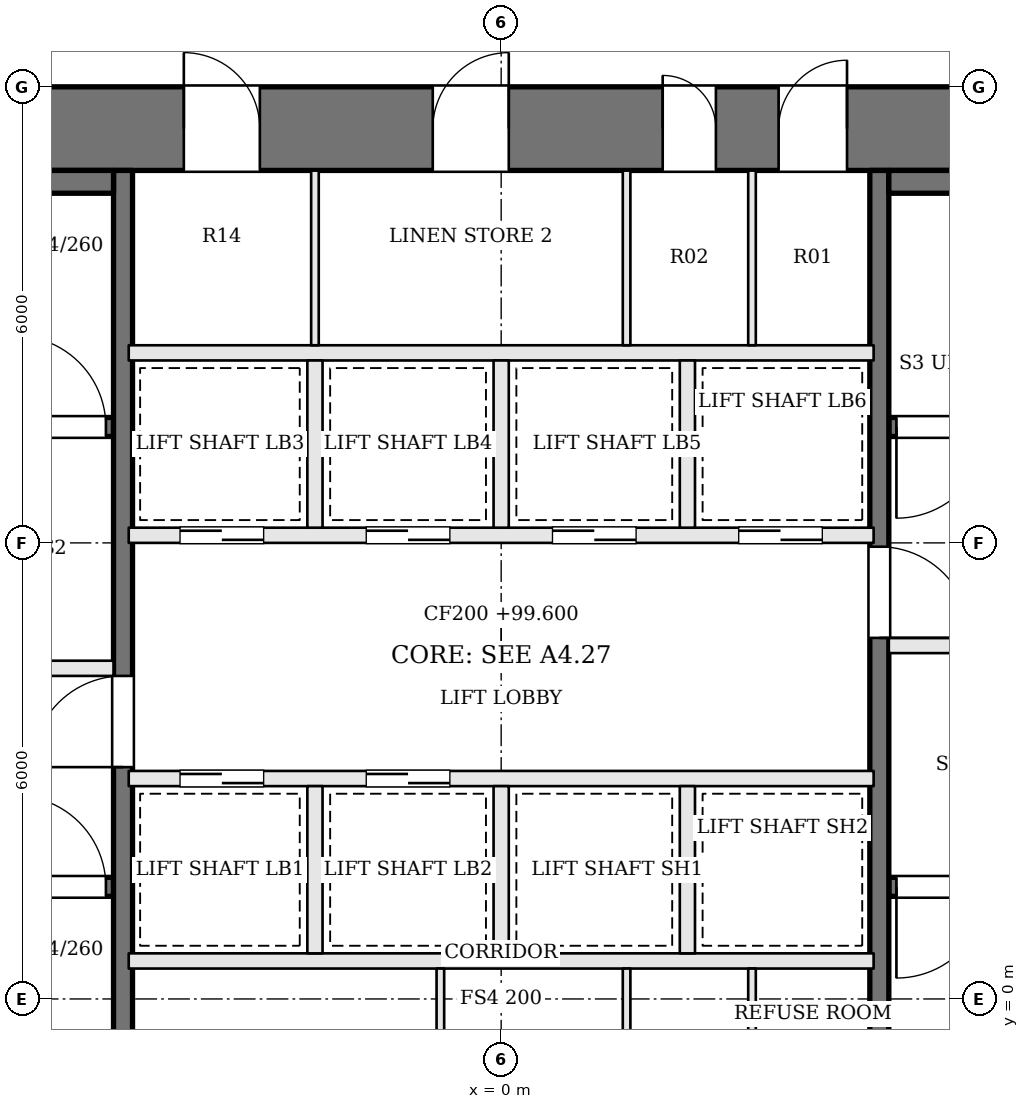
"""IFC4 building model, lengths in metres.
Left out: names, types, materials, properties, quantities, classifications, styles, units other than length and angle.
Written with IfcOpenShell. Run it as: python <this file> out.ifc"""

import sys

from ifc_helpers import new_model, si_unit, direction, frame, frame_2d, origin, place, context, subcontext, project, spatial, rectangle, extrude, element, fill, save


model = new_model("IFC4")
c1 = context("Model", 3, precision=1e-05, world=origin(), true_north=direction((0.0, 1.0)))
c2 = subcontext(c1, "Body", "Model", "MODEL_VIEW")
j1 = project(units=[si_unit("LENGTHUNIT", "METRE"), si_unit("PLANEANGLEUNIT", "RADIAN")], contexts=[c1])
p1 = place(None, origin())
s1 = spatial("IfcSite", under=j1, at=p1, CompositionType="ELEMENT")
p2 = place(p1, origin())
s2 = spatial("IfcBuilding", under=s1, at=p2, CompositionType="ELEMENT")
p3 = place(p2, frame((0.0, 0.0, 99.6)))
s3 = spatial("IfcBuildingStorey", under=s2, at=p3, CompositionType="ELEMENT", Elevation=99.6)
p4 = place(p3, frame((-13.0, 11.45, 0.0), z_axis=(0.0, 0.0, 1.0), x_axis=(1.0, 0.0, 0.0)))
e1 = element("IfcWall", 1, at=p4, inside=s3, PredefinedType="SHEAR", context=c2, shape_type="SweptSolid", body=[
    extrude(rectangle(XDim=26.0, YDim=1.1, at=frame_2d((13.0, 0.0))), origin(), (0.0, 0.0, 1.0), 3.6),
])
p5 = place(p4, frame((8.825, 0.0, 0.0)))
e2 = element("IfcOpeningElement", 2, at=p5, cuts=e1, PredefinedType="OPENING", context=c2, shape_type="SweptSolid", body=[
    extrude(rectangle(XDim=1.0, YDim=2.1, at=frame_2d((0.5, 1.05))), frame((0.0, 0.56, 0.0), z_axis=(0.0, -1.0, 0.0), x_axis=(1.0, 0.0, 0.0)), (0.0, 0.0, 1.0), 1.12),
])
p6 = place(p4, frame((12.1, 0.0, 0.0)))
e3 = element("IfcOpeningElement", 3, at=p6, cuts=e1, PredefinedType="OPENING", context=c2, shape_type="SweptSolid", body=[
    extrude(rectangle(XDim=1.0, YDim=2.1, at=frame_2d((0.5, 1.05))), frame((0.0, 0.56, 0.0), z_axis=(0.0, -1.0, 0.0), x_axis=(1.0, 0.0, 0.0)), (0.0, 0.0, 1.0), 1.12),
])
p7 = place(p4, frame((15.125, 0.0, 0.0)))
e4 = element("IfcOpeningElement", 4, at=p7, cuts=e1, PredefinedType="OPENING", context=c2, shape_type="SweptSolid", body=[
    extrude(rectangle(XDim=0.7, YDim=2.1, at=frame_2d((0.35, 1.05))), frame((0.0, 0.56, 0.0), z_axis=(0.0, -1.0, 0.0), x_axis=(1.0, 0.0, 0.0)), (0.0, 0.0, 1.0), 1.12),
])
p8 = place(p4, frame((16.65, 0.0, 0.0)))
e5 = element("IfcOpeningElement", 5, at=p8, cuts=e1, PredefinedType="OPENING", context=c2, shape_type="SweptSolid", body=[
    extrude(rectangle(XDim=0.9, YDim=2.1, at=frame_2d((0.45, 1.05))), frame((0.0, 0.56, 0.0), z_axis=(0.0, -1.0, 0.0), x_axis=(1.0, 0.0, 0.0)), (0.0, 0.0, 1.0), 1.12),
])
p9 = place(p3, frame((-11.9, 1.475, 0.0), z_axis=(0.0, 0.0, 1.0), x_axis=(1.0, 0.0, 0.0)))
e6 = element("IfcWall", 6, at=p9, inside=s3, PredefinedType="SOLIDWALL", context=c2, shape_type="SweptSolid", body=[
    extrude(rectangle(XDim=6.8, YDim=0.25, at=frame_2d((3.4, 0.0))), origin(), (0.0, 0.0, 1.0), 3.4),
])
p10 = place(p9, frame((5.5, 0.0, 0.0)))
e7 = element("IfcOpeningElement", 7, at=p10, cuts=e6, PredefinedType="OPENING", context=c2, shape_type="SweptSolid", body=[
    extrude(rectangle(XDim=1.2, YDim=2.1, at=frame_2d((0.6, 1.05))), frame((0.0, 0.135, 0.0), z_axis=(0.0, -1.0, 0.0), x_axis=(1.0, 0.0, 0.0)), (0.0, 0.0, 1.0), 0.27),
])
p11 = place(p3, frame((11.9, 7.525, 0.0), z_axis=(0.0, 0.0, 1.0), x_axis=(-1.0, 0.0, 0.0)))
e8 = element("IfcWall", 8, at=p11, inside=s3, PredefinedType="SOLIDWALL", context=c2, shape_type="SweptSolid", body=[
    extrude(rectangle(XDim=6.8, YDim=0.25, at=frame_2d((3.4, 0.0))), origin(), (0.0, 0.0, 1.0), 3.4),
])
p12 = place(p11, frame((5.5, 0.0, 0.0)))
e9 = element("IfcOpeningElement", 9, at=p12, cuts=e8, PredefinedType="OPENING", context=c2, shape_type="SweptSolid", body=[
    extrude(rectangle(XDim=1.2, YDim=2.1, at=frame_2d((0.6, 1.05))), frame((0.0, 0.135, 0.0), z_axis=(0.0, -1.0, 0.0), x_axis=(1.0, 0.0, 0.0)), (0.0, 0.0, 1.0), 0.27),
])
p13 = place(p3, frame((-11.9, 4.35, 0.0), z_axis=(0.0, 0.0, 1.0), x_axis=(1.0, 0.0, 0.0)))
e10 = element("IfcWall", 10, at=p13, inside=s3, PredefinedType="SOLIDWALL", context=c2, shape_type="SweptSolid", body=[
    extrude(rectangle(XDim=6.8, YDim=0.2, at=frame_2d((3.4, 0.0))), origin(), (0.0, 0.0, 1.0), 3.4),
])
p14 = place(p13, frame((4.1, 0.0, 0.0)))
e11 = element("IfcOpeningElement", 11, at=p14, cuts=e10, PredefinedType="OPENING", context=c2, shape_type="SweptSolid", body=[
    extrude(rectangle(XDim=1.2, YDim=2.1, at=frame_2d((0.6, 1.05))), frame((0.0, 0.11, 0.0), z_axis=(0.0, -1.0, 0.0), x_axis=(1.0, 0.0, 0.0)), (0.0, 0.0, 1.0), 0.22),
])
p15 = place(p13, frame((0.8, 0.0, 0.0)))
e12 = element("IfcOpeningElement", 12, at=p15, cuts=e10, PredefinedType="OPENING", context=c2, shape_type="SweptSolid", body=[
    extrude(rectangle(XDim=1.2, YDim=2.1, at=frame_2d((0.6, 1.05))), frame((0.0, 0.11, 0.0), z_axis=(0.0, -1.0, 0.0), x_axis=(1.0, 0.0, 0.0)), (0.0, 0.0, 1.0), 0.22),
])
p16 = place(p3, frame((11.9, 4.65, 0.0), z_axis=(0.0, 0.0, 1.0), x_axis=(-1.0, 0.0, 0.0)))
e13 = element("IfcWall", 13, at=p16, inside=s3, PredefinedType="SOLIDWALL", context=c2, shape_type="SweptSolid", body=[
    extrude(rectangle(XDim=6.8, YDim=0.2, at=frame_2d((3.4, 0.0))), origin(), (0.0, 0.0, 1.0), 3.4),
])
p17 = place(p16, frame((4.1, 0.0, 0.0)))
e14 = element("IfcOpeningElement", 14, at=p17, cuts=e13, PredefinedType="OPENING", context=c2, shape_type="SweptSolid", body=[
    extrude(rectangle(XDim=1.2, YDim=2.1, at=frame_2d((0.6, 1.05))), frame((0.0, 0.11, 0.0), z_axis=(0.0, -1.0, 0.0), x_axis=(1.0, 0.0, 0.0)), (0.0, 0.0, 1.0), 0.22),
])
p18 = place(p16, frame((0.8, 0.0, 0.0)))
e15 = element("IfcOpeningElement", 15, at=p18, cuts=e13, PredefinedType="OPENING", context=c2, shape_type="SweptSolid", body=[
    extrude(rectangle(XDim=1.2, YDim=2.1, at=frame_2d((0.6, 1.05))), frame((0.0, 0.11, 0.0), z_axis=(0.0, -1.0, 0.0), x_axis=(1.0, 0.0, 0.0)), (0.0, 0.0, 1.0), 0.22),
])
p19 = place(p3, frame((-11.9, 7.525, 0.0), z_axis=(0.0, 0.0, 1.0), x_axis=(1.0, 0.0, 0.0)))
e16 = element("IfcWall", 16, at=p19, inside=s3, PredefinedType="SOLIDWALL", context=c2, shape_type="SweptSolid", body=[
    extrude(rectangle(XDim=6.8, YDim=0.25, at=frame_2d((3.4, 0.0))), origin(), (0.0, 0.0, 1.0), 3.4),
])
p20 = place(p19, frame((5.5, 0.0, 0.0)))
e17 = element("IfcOpeningElement", 17, at=p20, cuts=e16, PredefinedType="OPENING", context=c2, shape_type="SweptSolid", body=[
    extrude(rectangle(XDim=1.2, YDim=2.1, at=frame_2d((0.6, 1.05))), frame((0.0, 0.135, 0.0), z_axis=(0.0, -1.0, 0.0), x_axis=(1.0, 0.0, 0.0)), (0.0, 0.0, 1.0), 0.27),
])
p21 = place(p3, frame((11.9, 1.475, 0.0), z_axis=(0.0, 0.0, 1.0), x_axis=(-1.0, 0.0, 0.0)))
e18 = element("IfcWall", 18, at=p21, inside=s3, PredefinedType="SOLIDWALL", context=c2, shape_type="SweptSolid", body=[
    extrude(rectangle(XDim=6.8, YDim=0.25, at=frame_2d((3.4, 0.0))), origin(), (0.0, 0.0, 1.0), 3.4),
])
p22 = place(p21, frame((5.5, 0.0, 0.0)))
e19 = element("IfcOpeningElement", 19, at=p22, cuts=e18, PredefinedType="OPENING", context=c2, shape_type="SweptSolid", body=[
    extrude(rectangle(XDim=1.2, YDim=2.1, at=frame_2d((0.6, 1.05))), frame((0.0, 0.135, 0.0), z_axis=(0.0, -1.0, 0.0), x_axis=(1.0, 0.0, 0.0)), (0.0, 0.0, 1.0), 0.27),
])
p23 = place(p3, frame((-4.975, -1.9, 0.0), z_axis=(0.0, 0.0, 1.0), x_axis=(0.0, 1.0, 0.0)))
e20 = element("IfcWall", 20, at=p23, inside=s3, PredefinedType="SOLIDWALL", context=c2, shape_type="SweptSolid", body=[
    extrude(rectangle(XDim=12.8, YDim=0.25, at=frame_2d((6.4, 0.0))), origin(), (0.0, 0.0, 1.0), 3.4),
])
p24 = place(p23, frame((4.95, 0.0, 0.0)))
e21 = element("IfcOpeningElement", 21, at=p24, cuts=e20, PredefinedType="OPENING", context=c2, shape_type="SweptSolid", body=[
    extrude(rectangle(XDim=1.2, YDim=2.1, at=frame_2d((0.6, 1.05))), frame((0.0, 0.135, 0.0), z_axis=(0.0, -1.0, 0.0), x_axis=(1.0, 0.0, 0.0)), (0.0, 0.0, 1.0), 0.27),
])
p25 = place(p3, frame((4.975, 10.9, 0.0), z_axis=(0.0, 0.0, 1.0), x_axis=(0.0, -1.0, 0.0)))
e22 = element("IfcWall", 22, at=p25, inside=s3, PredefinedType="SOLIDWALL", context=c2, shape_type="SweptSolid", body=[
    extrude(rectangle(XDim=12.8, YDim=0.25, at=frame_2d((6.4, 0.0))), origin(), (0.0, 0.0, 1.0), 3.4),
])
p26 = place(p25, frame((4.95, 0.0, 0.0)))
e23 = element("IfcOpeningElement", 23, at=p26, cuts=e22, PredefinedType="OPENING", context=c2, shape_type="SweptSolid", body=[
    extrude(rectangle(XDim=1.2, YDim=2.1, at=frame_2d((0.6, 1.05))), frame((0.0, 0.135, 0.0), z_axis=(0.0, -1.0, 0.0), x_axis=(1.0, 0.0, 0.0)), (0.0, 0.0, 1.0), 0.27),
])
for number, where, z_axis, x_axis in (
    (24, (-11.9, 10.75, 0.0), (0.0, 0.0, 1.0), (1.0, 0.0, 0.0)),
    (25, (11.9, 10.75, 0.0), (0.0, 0.0, 1.0), (-1.0, 0.0, 0.0)),
):
    element("IfcWall", number, at=place(p3, frame(where, z_axis=z_axis, x_axis=x_axis)), inside=s3, PredefinedType="SOLIDWALL", context=c2, shape_type="SweptSolid", body=[
        extrude(rectangle(XDim=6.8, YDim=0.3, at=frame_2d((3.4, 0.0))), origin(), (0.0, 0.0, 1.0), 3.4),
    ])
p27 = place(p3, frame((-4.9, 0.5, 0.0), z_axis=(0.0, 0.0, 1.0), x_axis=(1.0, 0.0, 0.0)))
e26 = element("IfcWall", 26, at=p27, inside=s3, PredefinedType="SOLIDWALL", context=c2, shape_type="SweptSolid", body=[
    extrude(rectangle(XDim=9.8, YDim=0.2, at=frame_2d((4.9, 0.0))), origin(), (0.0, 0.0, 1.0), 3.4),
])
p28 = place(p3, frame((-4.9, 2.9, 0.0), z_axis=(0.0, 0.0, 1.0), x_axis=(1.0, 0.0, 0.0)))
e27 = element("IfcWall", 27, at=p28, inside=s3, PredefinedType="SOLIDWALL", context=c2, shape_type="SweptSolid", body=[
    extrude(rectangle(XDim=9.8, YDim=0.2, at=frame_2d((4.9, 0.0))), origin(), (0.0, 0.0, 1.0), 3.4),
])
p29 = place(p28, frame((0.675, 0.0, 0.0)))
e28 = element("IfcOpeningElement", 28, at=p29, cuts=e27, PredefinedType="OPENING", context=c2, shape_type="SweptSolid", body=[
    extrude(rectangle(XDim=1.1, YDim=2.1, at=frame_2d((0.55, 1.05))), frame((0.0, 0.11, 0.0), z_axis=(0.0, -1.0, 0.0), x_axis=(1.0, 0.0, 0.0)), (0.0, 0.0, 1.0), 0.22),
])
p30 = place(p28, frame((3.125, 0.0, 0.0)))
e29 = element("IfcOpeningElement", 29, at=p30, cuts=e27, PredefinedType="OPENING", context=c2, shape_type="SweptSolid", body=[
    extrude(rectangle(XDim=1.1, YDim=2.1, at=frame_2d((0.55, 1.05))), frame((0.0, 0.11, 0.0), z_axis=(0.0, -1.0, 0.0), x_axis=(1.0, 0.0, 0.0)), (0.0, 0.0, 1.0), 0.22),
])
p31 = place(p3, frame((-4.9, 6.1, 0.0), z_axis=(0.0, 0.0, 1.0), x_axis=(1.0, 0.0, 0.0)))
e30 = element("IfcWall", 30, at=p31, inside=s3, PredefinedType="SOLIDWALL", context=c2, shape_type="SweptSolid", body=[
    extrude(rectangle(XDim=9.8, YDim=0.2, at=frame_2d((4.9, 0.0))), origin(), (0.0, 0.0, 1.0), 3.4),
])
p32 = place(p31, frame((0.675, 0.0, 0.0)))
e31 = element("IfcOpeningElement", 31, at=p32, cuts=e30, PredefinedType="OPENING", context=c2, shape_type="SweptSolid", body=[
    extrude(rectangle(XDim=1.1, YDim=2.1, at=frame_2d((0.55, 1.05))), frame((0.0, 0.11, 0.0), z_axis=(0.0, -1.0, 0.0), x_axis=(1.0, 0.0, 0.0)), (0.0, 0.0, 1.0), 0.22),
])
p33 = place(p31, frame((3.125, 0.0, 0.0)))
e32 = element("IfcOpeningElement", 32, at=p33, cuts=e30, PredefinedType="OPENING", context=c2, shape_type="SweptSolid", body=[
    extrude(rectangle(XDim=1.1, YDim=2.1, at=frame_2d((0.55, 1.05))), frame((0.0, 0.11, 0.0), z_axis=(0.0, -1.0, 0.0), x_axis=(1.0, 0.0, 0.0)), (0.0, 0.0, 1.0), 0.22),
])
p34 = place(p31, frame((5.575, 0.0, 0.0)))
e33 = element("IfcOpeningElement", 33, at=p34, cuts=e30, PredefinedType="OPENING", context=c2, shape_type="SweptSolid", body=[
    extrude(rectangle(XDim=1.1, YDim=2.1, at=frame_2d((0.55, 1.05))), frame((0.0, 0.11, 0.0), z_axis=(0.0, -1.0, 0.0), x_axis=(1.0, 0.0, 0.0)), (0.0, 0.0, 1.0), 0.22),
])
p35 = place(p31, frame((8.025, 0.0, 0.0)))
e34 = element("IfcOpeningElement", 34, at=p35, cuts=e30, PredefinedType="OPENING", context=c2, shape_type="SweptSolid", body=[
    extrude(rectangle(XDim=1.1, YDim=2.1, at=frame_2d((0.55, 1.05))), frame((0.0, 0.11, 0.0), z_axis=(0.0, -1.0, 0.0), x_axis=(1.0, 0.0, 0.0)), (0.0, 0.0, 1.0), 0.22),
])
p36 = place(p3, frame((-4.9, 8.5, 0.0), z_axis=(0.0, 0.0, 1.0), x_axis=(1.0, 0.0, 0.0)))
e35 = element("IfcWall", 35, at=p36, inside=s3, PredefinedType="SOLIDWALL", context=c2, shape_type="SweptSolid", body=[
    extrude(rectangle(XDim=9.8, YDim=0.2, at=frame_2d((4.9, 0.0))), origin(), (0.0, 0.0, 1.0), 3.4),
])
for number, where, z_axis, x_axis in (
    (36, (-2.45, 0.6, 0.0), (0.0, 0.0, 1.0), (0.0, 1.0, 0.0)),
    (37, (0.0, 0.6, 0.0), (0.0, 0.0, 1.0), (0.0, 1.0, 0.0)),
    (38, (2.45, 0.6, 0.0), (0.0, 0.0, 1.0), (0.0, 1.0, 0.0)),
    (39, (-2.45, 6.2, 0.0), (0.0, 0.0, 1.0), (0.0, 1.0, 0.0)),
    (40, (0.0, 6.2, 0.0), (0.0, 0.0, 1.0), (0.0, 1.0, 0.0)),
    (41, (2.45, 6.2, 0.0), (0.0, 0.0, 1.0), (0.0, 1.0, 0.0)),
):
    element("IfcWall", number, at=place(p3, frame(where, z_axis=z_axis, x_axis=x_axis)), inside=s3, PredefinedType="SOLIDWALL", context=c2, shape_type="SweptSolid", body=[
        extrude(rectangle(XDim=2.2, YDim=0.2, at=frame_2d((1.1, 0.0))), origin(), (0.0, 0.0, 1.0), 3.4),
    ])
for number, where, z_axis, x_axis in (
    (42, (-0.8, -1.9, 0.0), (0.0, 0.0, 1.0), (0.0, 1.0, 0.0)),
    (43, (1.65, -1.9, 0.0), (0.0, 0.0, 1.0), (0.0, 1.0, 0.0)),
    (44, (3.3, -1.9, 0.0), (0.0, 0.0, 1.0), (0.0, 1.0, 0.0)),
    (45, (-2.45, 8.6, 0.0), (0.0, 0.0, 1.0), (0.0, 1.0, 0.0)),
    (46, (1.65, 8.6, 0.0), (0.0, 0.0, 1.0), (0.0, 1.0, 0.0)),
    (47, (3.3, 8.6, 0.0), (0.0, 0.0, 1.0), (0.0, 1.0, 0.0)),
):
    element("IfcWall", number, at=place(p3, frame(where, z_axis=z_axis, x_axis=x_axis)), inside=s3, PredefinedType="PARTITIONING", context=c2, shape_type="SweptSolid", body=[
        extrude(rectangle(XDim=2.3, YDim=0.1, at=frame_2d((1.15, 0.0))), origin(), (0.0, 0.0, 1.0), 3.4),
    ])
p37 = place(p24, origin())
e48 = element("IfcDoor", 48, at=p37, inside=s3, OperationType="SINGLE_SWING_LEFT", PredefinedType="DOOR", context=c2, shape_type="SweptSolid", body=[
    extrude(rectangle(XDim=1.2, YDim=2.1, at=frame_2d((0.6, 1.05))), frame((0.0, 0.025, 0.0), z_axis=(0.0, -1.0, 0.0), x_axis=(1.0, 0.0, 0.0)), (0.0, 0.0, 1.0), 0.05),
])
fill(e21, e48)
p38 = place(p26, origin())
e49 = element("IfcDoor", 49, at=p38, inside=s3, OperationType="SINGLE_SWING_RIGHT", PredefinedType="DOOR", context=c2, shape_type="SweptSolid", body=[
    extrude(rectangle(XDim=1.2, YDim=2.1, at=frame_2d((0.6, 1.05))), frame((0.0, 0.025, 0.0), z_axis=(0.0, -1.0, 0.0), x_axis=(1.0, 0.0, 0.0)), (0.0, 0.0, 1.0), 0.05),
])
fill(e23, e49)
p39 = place(p10, origin())
e50 = element("IfcDoor", 50, at=p39, inside=s3, OperationType="SINGLE_SWING_LEFT", PredefinedType="DOOR", context=c2, shape_type="SweptSolid", body=[
    extrude(rectangle(XDim=1.2, YDim=2.1, at=frame_2d((0.6, 1.05))), frame((0.0, 0.025, 0.0), z_axis=(0.0, -1.0, 0.0), x_axis=(1.0, 0.0, 0.0)), (0.0, 0.0, 1.0), 0.05),
])
fill(e7, e50)
p40 = place(p12, origin())
e51 = element("IfcDoor", 51, at=p40, inside=s3, OperationType="SINGLE_SWING_RIGHT", PredefinedType="DOOR", context=c2, shape_type="SweptSolid", body=[
    extrude(rectangle(XDim=1.2, YDim=2.1, at=frame_2d((0.6, 1.05))), frame((0.0, 0.025, 0.0), z_axis=(0.0, -1.0, 0.0), x_axis=(1.0, 0.0, 0.0)), (0.0, 0.0, 1.0), 0.05),
])
fill(e9, e51)
p41 = place(p20, origin())
e52 = element("IfcDoor", 52, at=p41, inside=s3, OperationType="SINGLE_SWING_LEFT", PredefinedType="DOOR", context=c2, shape_type="SweptSolid", body=[
    extrude(rectangle(XDim=1.2, YDim=2.1, at=frame_2d((0.6, 1.05))), frame((0.0, 0.025, 0.0), z_axis=(0.0, -1.0, 0.0), x_axis=(1.0, 0.0, 0.0)), (0.0, 0.0, 1.0), 0.05),
])
fill(e17, e52)
p42 = place(p22, origin())
e53 = element("IfcDoor", 53, at=p42, inside=s3, OperationType="SINGLE_SWING_RIGHT", PredefinedType="DOOR", context=c2, shape_type="SweptSolid", body=[
    extrude(rectangle(XDim=1.2, YDim=2.1, at=frame_2d((0.6, 1.05))), frame((0.0, 0.025, 0.0), z_axis=(0.0, -1.0, 0.0), x_axis=(1.0, 0.0, 0.0)), (0.0, 0.0, 1.0), 0.05),
])
fill(e19, e53)
p43 = place(p29, origin())
e54 = element("IfcDoor", 54, at=p43, inside=s3, OperationType="SLIDING_TO_RIGHT", PredefinedType="DOOR", context=c2, shape_type="SweptSolid", body=[
    extrude(rectangle(XDim=1.1, YDim=2.1, at=frame_2d((0.55, 1.05))), frame((0.0, 0.025, 0.0), z_axis=(0.0, -1.0, 0.0), x_axis=(1.0, 0.0, 0.0)), (0.0, 0.0, 1.0), 0.05),
])
fill(e28, e54)
p44 = place(p30, origin())
e55 = element("IfcDoor", 55, at=p44, inside=s3, OperationType="SLIDING_TO_LEFT", PredefinedType="DOOR", context=c2, shape_type="SweptSolid", body=[
    extrude(rectangle(XDim=1.1, YDim=2.1, at=frame_2d((0.55, 1.05))), frame((0.0, 0.025, 0.0), z_axis=(0.0, -1.0, 0.0), x_axis=(1.0, 0.0, 0.0)), (0.0, 0.0, 1.0), 0.05),
])
fill(e29, e55)
p45 = place(p32, origin())
e56 = element("IfcDoor", 56, at=p45, inside=s3, OperationType="SLIDING_TO_RIGHT", PredefinedType="DOOR", context=c2, shape_type="SweptSolid", body=[
    extrude(rectangle(XDim=1.1, YDim=2.1, at=frame_2d((0.55, 1.05))), frame((0.0, 0.025, 0.0), z_axis=(0.0, -1.0, 0.0), x_axis=(1.0, 0.0, 0.0)), (0.0, 0.0, 1.0), 0.05),
])
fill(e31, e56)
p46 = place(p33, origin())
e57 = element("IfcDoor", 57, at=p46, inside=s3, OperationType="SLIDING_TO_LEFT", PredefinedType="DOOR", context=c2, shape_type="SweptSolid", body=[
    extrude(rectangle(XDim=1.1, YDim=2.1, at=frame_2d((0.55, 1.05))), frame((0.0, 0.025, 0.0), z_axis=(0.0, -1.0, 0.0), x_axis=(1.0, 0.0, 0.0)), (0.0, 0.0, 1.0), 0.05),
])
fill(e32, e57)
p47 = place(p34, origin())
e58 = element("IfcDoor", 58, at=p47, inside=s3, OperationType="SLIDING_TO_RIGHT", PredefinedType="DOOR", context=c2, shape_type="SweptSolid", body=[
    extrude(rectangle(XDim=1.1, YDim=2.1, at=frame_2d((0.55, 1.05))), frame((0.0, 0.025, 0.0), z_axis=(0.0, -1.0, 0.0), x_axis=(1.0, 0.0, 0.0)), (0.0, 0.0, 1.0), 0.05),
])
fill(e33, e58)
p48 = place(p35, origin())
e59 = element("IfcDoor", 59, at=p48, inside=s3, OperationType="SLIDING_TO_LEFT", PredefinedType="DOOR", context=c2, shape_type="SweptSolid", body=[
    extrude(rectangle(XDim=1.1, YDim=2.1, at=frame_2d((0.55, 1.05))), frame((0.0, 0.025, 0.0), z_axis=(0.0, -1.0, 0.0), x_axis=(1.0, 0.0, 0.0)), (0.0, 0.0, 1.0), 0.05),
])
fill(e34, e59)
p49 = place(p5, origin())
e60 = element("IfcDoor", 60, at=p49, inside=s3, OperationType="SINGLE_SWING_LEFT", PredefinedType="DOOR", context=c2, shape_type="SweptSolid", body=[
    extrude(rectangle(XDim=1.0, YDim=2.1, at=frame_2d((0.5, 1.05))), frame((0.0, 0.025, 0.0), z_axis=(0.0, -1.0, 0.0), x_axis=(1.0, 0.0, 0.0)), (0.0, 0.0, 1.0), 0.05),
])
fill(e2, e60)
p50 = place(p6, origin())
e61 = element("IfcDoor", 61, at=p50, inside=s3, OperationType="SINGLE_SWING_RIGHT", PredefinedType="DOOR", context=c2, shape_type="SweptSolid", body=[
    extrude(rectangle(XDim=1.0, YDim=2.1, at=frame_2d((0.5, 1.05))), frame((0.0, 0.025, 0.0), z_axis=(0.0, -1.0, 0.0), x_axis=(1.0, 0.0, 0.0)), (0.0, 0.0, 1.0), 0.05),
])
fill(e3, e61)
p51 = place(p7, origin())
e62 = element("IfcDoor", 62, at=p51, inside=s3, OperationType="SINGLE_SWING_LEFT", PredefinedType="DOOR", context=c2, shape_type="SweptSolid", body=[
    extrude(rectangle(XDim=0.7, YDim=2.1, at=frame_2d((0.35, 1.05))), frame((0.0, 0.025, 0.0), z_axis=(0.0, -1.0, 0.0), x_axis=(1.0, 0.0, 0.0)), (0.0, 0.0, 1.0), 0.05),
])
fill(e4, e62)
p52 = place(p8, origin())
e63 = element("IfcDoor", 63, at=p52, inside=s3, OperationType="SINGLE_SWING_RIGHT", PredefinedType="DOOR", context=c2, shape_type="SweptSolid", body=[
    extrude(rectangle(XDim=0.9, YDim=2.1, at=frame_2d((0.45, 1.05))), frame((0.0, 0.025, 0.0), z_axis=(0.0, -1.0, 0.0), x_axis=(1.0, 0.0, 0.0)), (0.0, 0.0, 1.0), 0.05),
])
fill(e5, e63)
save(model, sys.argv[1])
